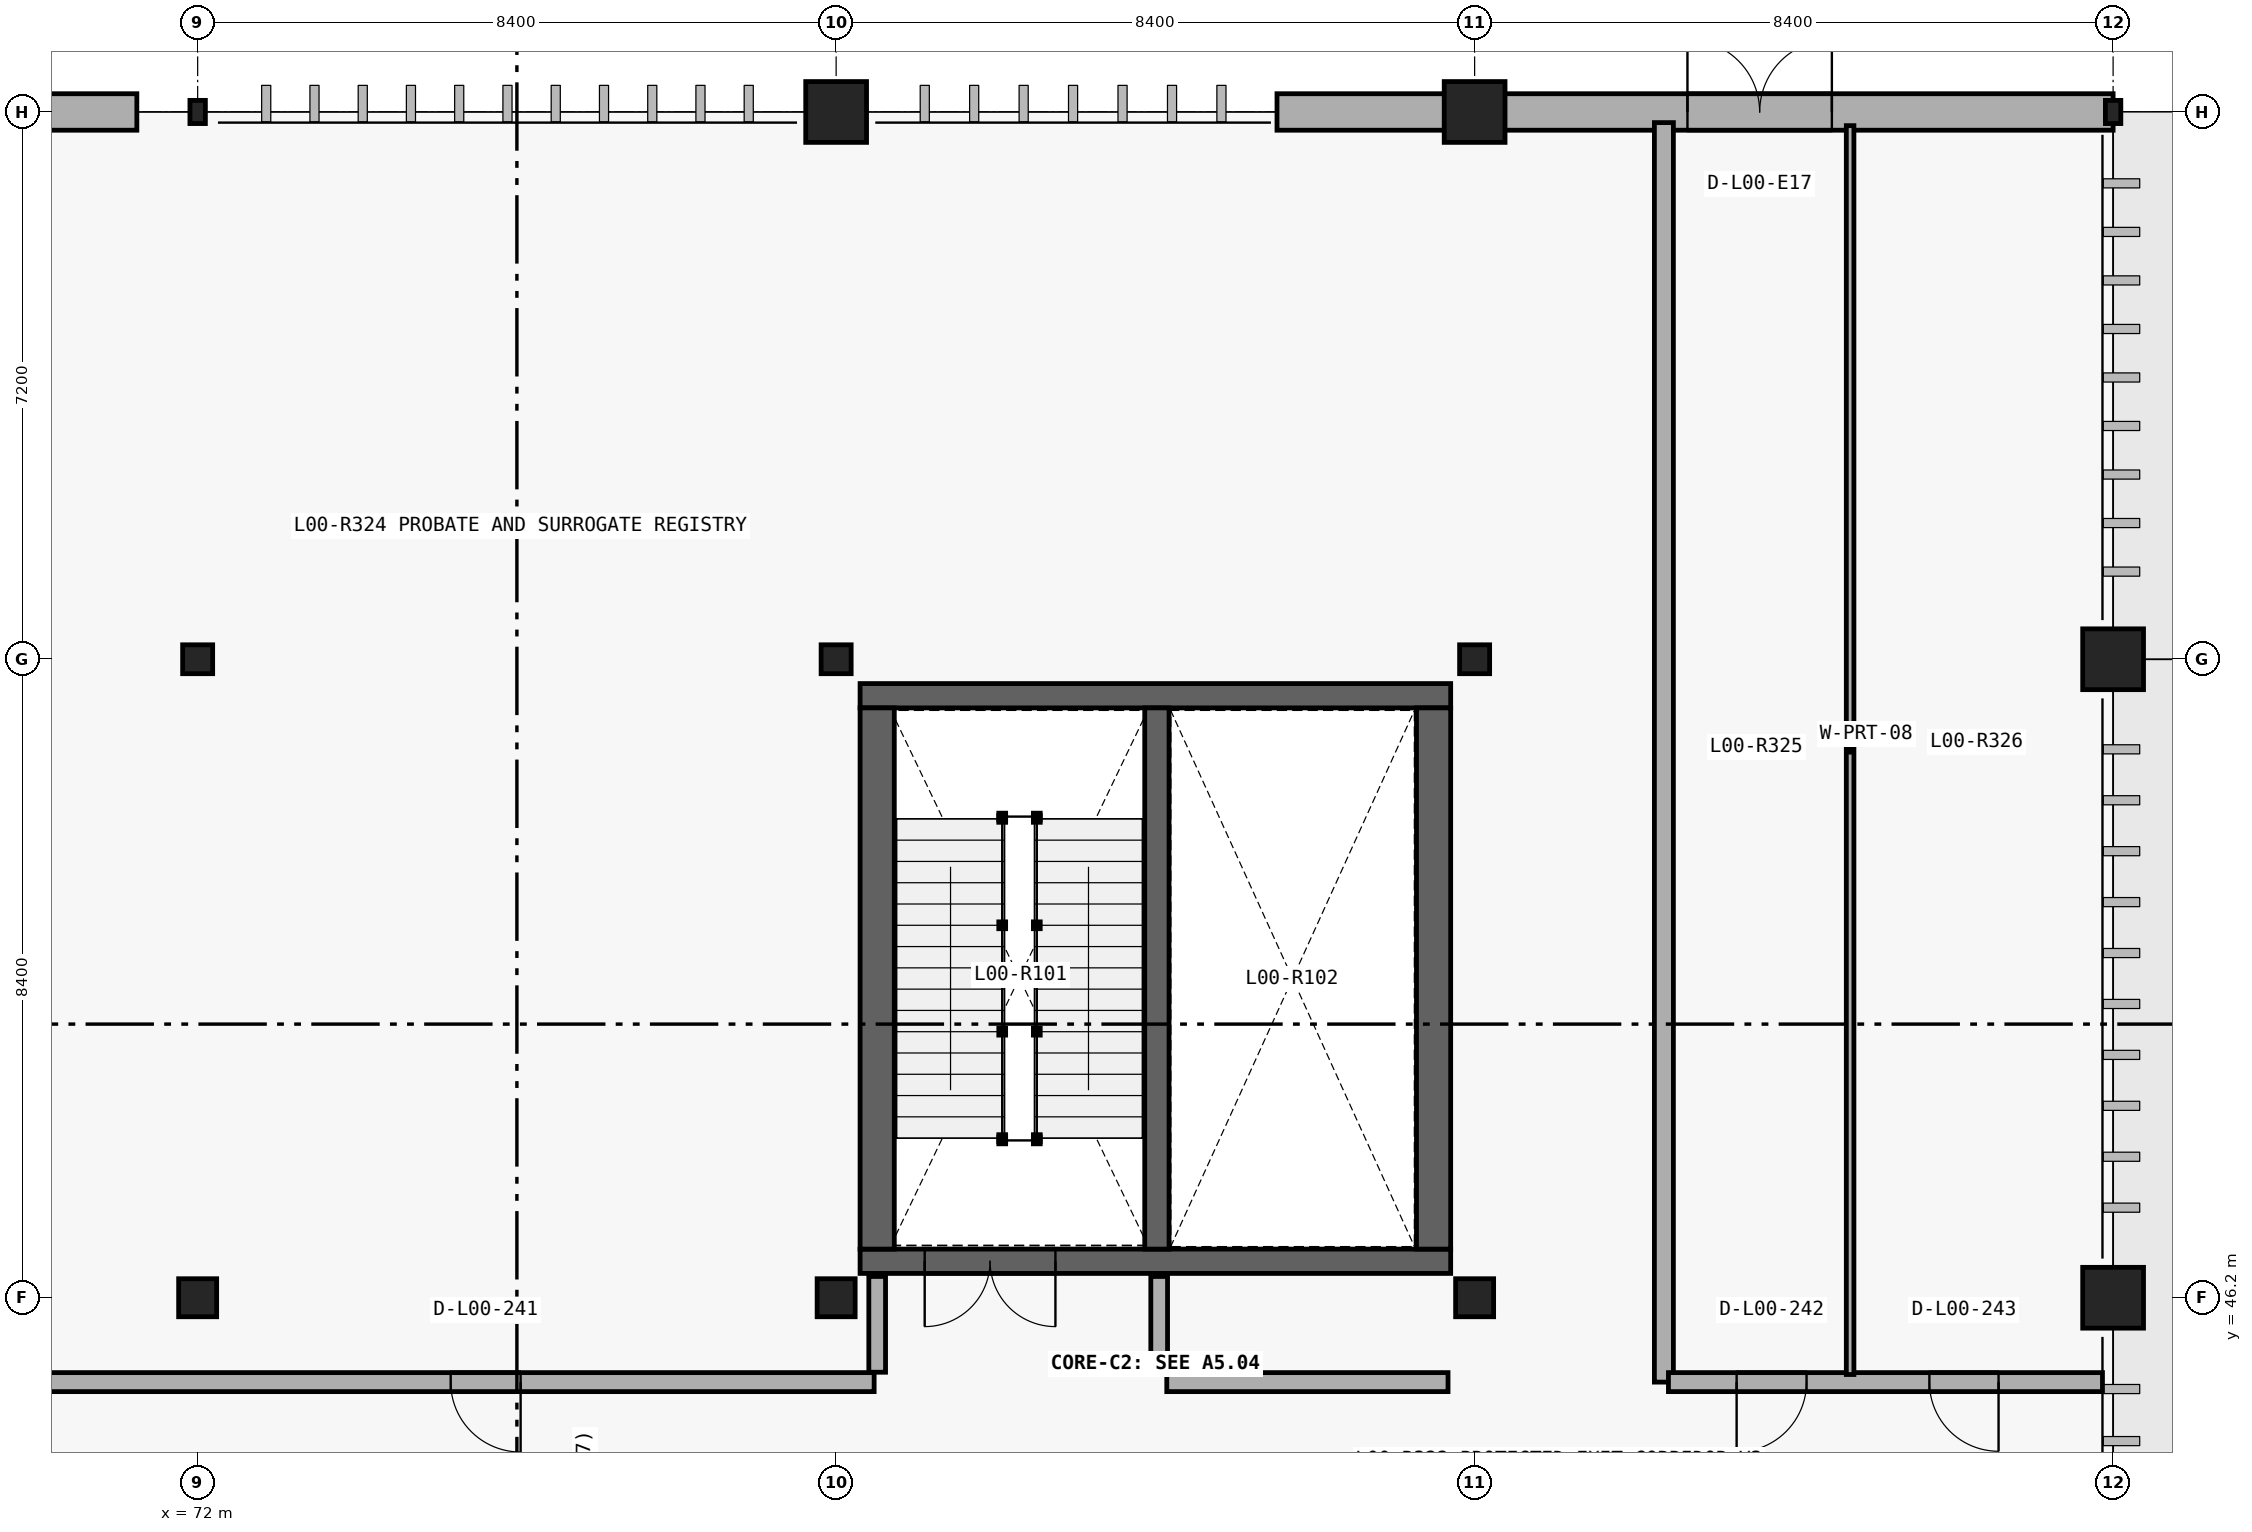
"""IFC4 building model, lengths in metres.
Left out: names, types, materials, properties, quantities, classifications, styles, units other than length and angle.
Written with IfcOpenShell. Run it as: python <this file> out.ifc"""

import sys

from ifc_helpers import new_model, si_unit, direction, frame, frame_2d, origin_with_axes, origin_2d_with_axis, place, context, subcontext, project, spatial, rectangle, hollow_rectangle, circle, i_section, extrude, element, fill, save


model = new_model("IFC4")
c1 = context("Model", 3, precision=1e-05, world=origin_with_axes(), true_north=direction((0.0, 1.0)))
c2 = subcontext(c1, "Body", "Model", "MODEL_VIEW")
j1 = project(units=[si_unit("LENGTHUNIT", "METRE"), si_unit("PLANEANGLEUNIT", "RADIAN")], contexts=[c1])
p1 = place(None, origin_with_axes())
s1 = spatial("IfcSite", under=j1, at=p1, CompositionType="ELEMENT")
p2 = place(p1, origin_with_axes())
s2 = spatial("IfcBuilding", under=s1, at=p2, CompositionType="ELEMENT")
p3 = place(p2, origin_with_axes())
s3 = spatial("IfcBuildingStorey", under=s2, at=p3, CompositionType="ELEMENT", Elevation=0.0)
p4 = place(None, frame((64.4, 61.8, 0.0), z_axis=(0.0, 0.0, 1.0), x_axis=(1.0, 0.0, 0.0)))
e1 = element("IfcWall", 1, at=p4, inside=s3, PredefinedType="SOLIDWALL", context=c2, shape_type="SweptSolid", body=[
    extrude(rectangle(XDim=6.8, YDim=0.48, at=frame_2d((3.4, 0.0), x_axis=(1.0, 0.0))), origin_with_axes(), (0.0, 0.0, 1.0), 4.825),
])
p5 = place(None, frame((67.85, 61.8, 0.0), z_axis=(0.0, 0.0, 1.0), x_axis=(1.0, 0.0, 0.0)))
e2 = element("IfcOpeningElement", 2, at=p5, cuts=e1, PredefinedType="OPENING", context=c2, shape_type="SweptSolid", body=[
    extrude(rectangle(XDim=1.9, YDim=2.4, at=frame_2d((0.0, 1.2), x_axis=(1.0, 0.0))), frame((0.0, 0.25, 0.0), z_axis=(0.0, -1.0, 0.0), x_axis=(1.0, 0.0, 0.0)), (0.0, 0.0, 1.0), 0.5),
])
p6 = place(None, frame((86.2, 61.8, 0.0), z_axis=(0.0, 0.0, 1.0), x_axis=(1.0, 0.0, 0.0)))
e3 = element("IfcWall", 3, at=p6, inside=s3, PredefinedType="SOLIDWALL", context=c2, shape_type="SweptSolid", body=[
    extrude(rectangle(XDim=11.0, YDim=0.48, at=frame_2d((5.5, 0.0), x_axis=(1.0, 0.0))), origin_with_axes(), (0.0, 0.0, 1.0), 4.724),
])
p7 = place(None, frame((92.55, 61.8, 0.0), z_axis=(0.0, 0.0, 1.0), x_axis=(1.0, 0.0, 0.0)))
e4 = element("IfcOpeningElement", 4, at=p7, cuts=e3, PredefinedType="OPENING", context=c2, shape_type="SweptSolid", body=[
    extrude(rectangle(XDim=1.9, YDim=2.4, at=frame_2d((0.0, 1.2), x_axis=(1.0, 0.0))), frame((0.0, 0.25, 0.0), z_axis=(0.0, -1.0, 0.0), x_axis=(1.0, 0.0, 0.0)), (0.0, 0.0, 1.0), 0.5),
])
p8 = place(None, frame((80.715, 46.68, 0.0), z_axis=(0.0, 0.0, 1.0), x_axis=(1.0, 0.0, 0.0)))
e5 = element("IfcWall", 5, at=p8, inside=s3, PredefinedType="SHEAR", context=c2, shape_type="SweptSolid", body=[
    extrude(rectangle(XDim=7.77, YDim=0.32, at=frame_2d((3.885, 0.0), x_axis=(1.0, 0.0))), origin_with_axes(), (0.0, 0.0, 1.0), 5.4),
])
p9 = place(None, frame((82.425, 46.68, 0.0), z_axis=(0.0, 0.0, 1.0), x_axis=(1.0, 0.0, 0.0)))
e6 = element("IfcOpeningElement", 6, at=p9, cuts=e5, PredefinedType="OPENING", context=c2, shape_type="SweptSolid", body=[
    extrude(rectangle(XDim=1.72, YDim=2.18, at=frame_2d((0.0, 1.09), x_axis=(1.0, 0.0))), frame((0.0, 0.17, 0.0), z_axis=(0.0, -1.0, 0.0), x_axis=(1.0, 0.0, 0.0)), (0.0, 0.0, 1.0), 0.34),
])
p10 = place(None, frame((88.485, 54.12, 0.0), z_axis=(0.0, 0.0, 1.0), x_axis=(-1.0, 0.0, 0.0)))
e7 = element("IfcWall", 7, at=p10, inside=s3, PredefinedType="SHEAR", context=c2, shape_type="SweptSolid", body=[
    extrude(rectangle(XDim=7.77, YDim=0.32, at=frame_2d((3.885, 0.0), x_axis=(1.0, 0.0))), origin_with_axes(), (0.0, 0.0, 1.0), 5.4),
])
for number, where, z_axis, x_axis in (
    (8, (88.26, 46.84, 0.0), (0.0, 0.0, 1.0), (0.0, 1.0, 0.0)),
    (9, (80.94, 53.96, 0.0), (0.0, 0.0, 1.0), (0.0, -1.0, 0.0)),
):
    element("IfcWall", number, at=place(None, frame(where, z_axis=z_axis, x_axis=x_axis)), inside=s3, PredefinedType="SHEAR", context=c2, shape_type="SweptSolid", body=[
        extrude(rectangle(XDim=7.12, YDim=0.45, at=frame_2d((3.56, 0.0), x_axis=(1.0, 0.0))), origin_with_axes(), (0.0, 0.0, 1.0), 5.4),
    ])
p11 = place(None, frame((84.62, 46.84, 0.0), z_axis=(0.0, 0.0, 1.0), x_axis=(0.0, 1.0, 0.0)))
e10 = element("IfcWall", 10, at=p11, inside=s3, PredefinedType="SHEAR", context=c2, shape_type="SweptSolid", body=[
    extrude(rectangle(XDim=7.12, YDim=0.32, at=frame_2d((3.56, 0.0), x_axis=(1.0, 0.0))), origin_with_axes(), (0.0, 0.0, 1.0), 5.4),
])
p12 = place(None, frame((91.29, 45.09, 0.0), z_axis=(0.0, 0.0, 1.0), x_axis=(0.0, 1.0, 0.0)))
e11 = element("IfcWall", 11, at=p12, inside=s3, PredefinedType="PARTITIONING", context=c2, shape_type="SweptSolid", body=[
    extrude(rectangle(XDim=16.57, YDim=0.25, at=frame_2d((8.285, 0.0), x_axis=(1.0, 0.0))), origin_with_axes(), (0.0, 0.0, 1.0), 5.08),
])
for number, where, z_axis, x_axis in (
    (12, (80.94, 45.22, 0.0), (0.0, 0.0, 1.0), (0.0, 1.0, 0.0)),
    (13, (84.65, 45.22, 0.0), (0.0, 0.0, 1.0), (0.0, 1.0, 0.0)),
):
    element("IfcWall", number, at=place(None, frame(where, z_axis=z_axis, x_axis=x_axis)), inside=s3, PredefinedType="PARTITIONING", context=c2, shape_type="SweptSolid", body=[
        extrude(rectangle(XDim=1.26, YDim=0.22, at=frame_2d((0.63, 0.0), x_axis=(1.0, 0.0))), origin_with_axes(), (0.0, 0.0, 1.0), 5.08),
    ])
p13 = place(None, frame((69.55, 45.09, 0.0), z_axis=(0.0, 0.0, 1.0), x_axis=(1.0, 0.0, 0.0)))
e14 = element("IfcWall", 14, at=p13, inside=s3, PredefinedType="PARTITIONING", context=c2, shape_type="SweptSolid", body=[
    extrude(rectangle(XDim=11.35, YDim=0.25, at=frame_2d((5.675, 0.0), x_axis=(1.0, 0.0))), origin_with_axes(), (0.0, 0.0, 1.0), 5.08),
])
p14 = place(None, frame((75.789, 45.09, 0.0), z_axis=(0.0, 0.0, 1.0), x_axis=(1.0, 0.0, 0.0)))
e15 = element("IfcOpeningElement", 15, at=p14, cuts=e14, PredefinedType="OPENING", context=c2, shape_type="SweptSolid", body=[
    extrude(rectangle(XDim=0.92, YDim=2.14, at=frame_2d((0.0, 1.07), x_axis=(1.0, 0.0))), frame((0.0, 0.135, 0.0), z_axis=(0.0, -1.0, 0.0), x_axis=(1.0, 0.0, 0.0)), (0.0, 0.0, 1.0), 0.27),
])
p15 = place(None, frame((84.75, 45.09, 0.0), z_axis=(0.0, 0.0, 1.0), x_axis=(1.0, 0.0, 0.0)))
e16 = element("IfcWall", 16, at=p15, inside=s3, PredefinedType="PARTITIONING", context=c2, shape_type="SweptSolid", body=[
    extrude(rectangle(XDim=3.7, YDim=0.25, at=frame_2d((1.85, 0.0), x_axis=(1.0, 0.0))), origin_with_axes(), (0.0, 0.0, 1.0), 5.08),
])
p16 = place(None, frame((91.35, 45.09, 0.0), z_axis=(0.0, 0.0, 1.0), x_axis=(1.0, 0.0, 0.0)))
e17 = element("IfcWall", 17, at=p16, inside=s3, PredefinedType="PARTITIONING", context=c2, shape_type="SweptSolid", body=[
    extrude(rectangle(XDim=5.71, YDim=0.25, at=frame_2d((2.855, 0.0), x_axis=(1.0, 0.0))), origin_with_axes(), (0.0, 0.0, 1.0), 5.08),
])
p17 = place(None, frame((92.707, 45.09, 0.0), z_axis=(0.0, 0.0, 1.0), x_axis=(1.0, 0.0, 0.0)))
e18 = element("IfcOpeningElement", 18, at=p17, cuts=e17, PredefinedType="OPENING", context=c2, shape_type="SweptSolid", body=[
    extrude(rectangle(XDim=0.92, YDim=2.14, at=frame_2d((0.0, 1.07), x_axis=(1.0, 0.0))), frame((0.0, 0.135, 0.0), z_axis=(0.0, -1.0, 0.0), x_axis=(1.0, 0.0, 0.0)), (0.0, 0.0, 1.0), 0.27),
])
p18 = place(None, frame((95.238, 45.09, 0.0), z_axis=(0.0, 0.0, 1.0), x_axis=(1.0, 0.0, 0.0)))
e19 = element("IfcOpeningElement", 19, at=p18, cuts=e17, PredefinedType="OPENING", context=c2, shape_type="SweptSolid", body=[
    extrude(rectangle(XDim=0.91, YDim=2.12, at=frame_2d((0.0, 1.06), x_axis=(1.0, 0.0))), frame((0.0, 0.135, 0.0), z_axis=(0.0, -1.0, 0.0), x_axis=(1.0, 0.0, 0.0)), (0.0, 0.0, 1.0), 0.27),
])
p19 = place(None, frame((93.74, 45.19, 0.0), z_axis=(0.0, 0.0, 1.0), x_axis=(0.0, 1.0, 0.0)))
e20 = element("IfcWall", 20, at=p19, inside=s3, PredefinedType="PARTITIONING", context=c2, shape_type="SweptSolid", body=[
    extrude(rectangle(XDim=16.43, YDim=0.1, at=frame_2d((8.215, 0.0), x_axis=(1.0, 0.0))), origin_with_axes(), (0.0, 0.0, 1.0), 5.08),
])
p20 = place(None, frame((72.0, 46.2, 0.0), z_axis=(0.0, 0.0, 1.0), x_axis=(1.0, 0.0, 0.0)))
e21 = element("IfcColumn", 21, at=p20, inside=s3, PredefinedType="COLUMN", context=c2, shape_type="SweptSolid", body=[
    extrude(i_section(OverallWidth=0.5, OverallDepth=0.5, WebThickness=0.022, FlangeThickness=0.036, at=origin_2d_with_axis()), origin_with_axes(), (0.0, 0.0, 1.0), 5.4),
])
p21 = place(None, frame((72.0, 54.6, 0.0), z_axis=(0.0, 0.0, 1.0), x_axis=(1.0, 0.0, 0.0)))
e22 = element("IfcColumn", 22, at=p21, inside=s3, PredefinedType="COLUMN", context=c2, shape_type="SweptSolid", body=[
    extrude(i_section(OverallWidth=0.395, OverallDepth=0.38, WebThickness=0.019, FlangeThickness=0.03, at=origin_2d_with_axis()), origin_with_axes(), (0.0, 0.0, 1.0), 5.4),
])
p22 = place(None, frame((72.0, 61.8, 0.0), z_axis=(0.0, 0.0, 1.0), x_axis=(1.0, 0.0, 0.0)))
e23 = element("IfcColumn", 23, at=p22, inside=s3, PredefinedType="COLUMN", context=c2, shape_type="SweptSolid", body=[
    extrude(hollow_rectangle(XDim=0.203, YDim=0.305, WallThickness=0.013, InnerFilletRadius=0.025, OuterFilletRadius=0.013, at=origin_2d_with_axis()), origin_with_axes(), (0.0, 0.0, 1.0), 5.4),
])
p23 = place(None, frame((80.4, 46.2, 0.0), z_axis=(0.0, 0.0, 1.0), x_axis=(1.0, 0.0, 0.0)))
e24 = element("IfcColumn", 24, at=p23, inside=s3, PredefinedType="COLUMN", context=c2, shape_type="SweptSolid", body=[
    extrude(i_section(OverallWidth=0.5, OverallDepth=0.5, WebThickness=0.022, FlangeThickness=0.036, at=origin_2d_with_axis()), origin_with_axes(), (0.0, 0.0, 1.0), 5.4),
])
p24 = place(None, frame((80.4, 54.6, 0.0), z_axis=(0.0, 0.0, 1.0), x_axis=(1.0, 0.0, 0.0)))
e25 = element("IfcColumn", 25, at=p24, inside=s3, PredefinedType="COLUMN", context=c2, shape_type="SweptSolid", body=[
    extrude(i_section(OverallWidth=0.395, OverallDepth=0.38, WebThickness=0.019, FlangeThickness=0.03, at=origin_2d_with_axis()), origin_with_axes(), (0.0, 0.0, 1.0), 5.4),
])
p25 = place(None, frame((80.4, 61.8, 0.0), z_axis=(0.0, 0.0, 1.0), x_axis=(1.0, 0.0, 0.0)))
e26 = element("IfcColumn", 26, at=p25, inside=s3, PredefinedType="COLUMN", context=c2, shape_type="SweptSolid", body=[
    extrude(circle(Radius=0.4, at=origin_2d_with_axis()), origin_with_axes(), (0.0, 0.0, 1.0), 5.4),
])
p26 = place(None, frame((88.8, 46.2, 0.0), z_axis=(0.0, 0.0, 1.0), x_axis=(1.0, 0.0, 0.0)))
e27 = element("IfcColumn", 27, at=p26, inside=s3, PredefinedType="COLUMN", context=c2, shape_type="SweptSolid", body=[
    extrude(i_section(OverallWidth=0.5, OverallDepth=0.5, WebThickness=0.022, FlangeThickness=0.036, at=origin_2d_with_axis()), origin_with_axes(), (0.0, 0.0, 1.0), 5.4),
])
p27 = place(None, frame((88.8, 54.6, 0.0), z_axis=(0.0, 0.0, 1.0), x_axis=(1.0, 0.0, 0.0)))
e28 = element("IfcColumn", 28, at=p27, inside=s3, PredefinedType="COLUMN", context=c2, shape_type="SweptSolid", body=[
    extrude(i_section(OverallWidth=0.395, OverallDepth=0.38, WebThickness=0.019, FlangeThickness=0.03, at=origin_2d_with_axis()), origin_with_axes(), (0.0, 0.0, 1.0), 5.4),
])
for number, where, z_axis, x_axis in (
    (29, (88.8, 61.8, 0.0), (0.0, 0.0, 1.0), (1.0, 0.0, 0.0)),
    (30, (97.2, 46.2, 0.0), (0.0, 0.0, 1.0), (1.0, 0.0, 0.0)),
    (31, (97.2, 54.6, 0.0), (0.0, 0.0, 1.0), (1.0, 0.0, 0.0)),
):
    element("IfcColumn", number, at=place(None, frame(where, z_axis=z_axis, x_axis=x_axis)), inside=s3, PredefinedType="COLUMN", context=c2, shape_type="SweptSolid", body=[
        extrude(circle(Radius=0.4, at=origin_2d_with_axis()), origin_with_axes(), (0.0, 0.0, 1.0), 5.4),
    ])
p28 = place(None, frame((97.2, 61.8, 0.0), z_axis=(0.0, 0.0, 1.0), x_axis=(1.0, 0.0, 0.0)))
e32 = element("IfcColumn", 32, at=p28, inside=s3, PredefinedType="COLUMN", context=c2, shape_type="SweptSolid", body=[
    extrude(hollow_rectangle(XDim=0.203, YDim=0.305, WallThickness=0.013, InnerFilletRadius=0.025, OuterFilletRadius=0.013, at=origin_2d_with_axis()), origin_with_axes(), (0.0, 0.0, 1.0), 5.4),
])
p29 = place(None, frame((92.55, 61.8, 0.0), z_axis=(0.0, 0.0, 1.0), x_axis=(1.0, 0.0, 0.0)))
e33 = element("IfcDoor", 33, at=p29, inside=s3, OperationType="DOUBLE_DOOR_SINGLE_SWING", PredefinedType="DOOR", context=c2, shape_type="SweptSolid", body=[
    extrude(rectangle(XDim=1.9, YDim=2.4, at=frame_2d((0.0, 1.2), x_axis=(1.0, 0.0))), frame((0.0, 0.04, 0.0), z_axis=(0.0, -1.0, 0.0), x_axis=(1.0, 0.0, 0.0)), (0.0, 0.0, 1.0), 0.08),
])
fill(e4, e33)
p30 = place(None, frame((82.425, 46.68, 0.0), z_axis=(0.0, 0.0, 1.0), x_axis=(-1.0, 0.0, 0.0)))
e34 = element("IfcDoor", 34, at=p30, inside=s3, OperationType="DOUBLE_DOOR_SINGLE_SWING", PredefinedType="DOOR", context=c2, shape_type="SweptSolid", body=[
    extrude(rectangle(XDim=1.72, YDim=2.18, at=frame_2d((0.0, 1.09), x_axis=(1.0, 0.0))), frame((0.0, 0.04, 0.0), z_axis=(0.0, -1.0, 0.0), x_axis=(1.0, 0.0, 0.0)), (0.0, 0.0, 1.0), 0.08),
])
fill(e6, e34)
p31 = place(None, frame((75.789, 45.09, 0.0), z_axis=(0.0, 0.0, 1.0), x_axis=(-1.0, 0.0, 0.0)))
e35 = element("IfcDoor", 35, at=p31, inside=s3, OperationType="SINGLE_SWING_RIGHT", PredefinedType="DOOR", context=c2, shape_type="SweptSolid", body=[
    extrude(rectangle(XDim=0.92, YDim=2.14, at=frame_2d((0.0, 1.07), x_axis=(1.0, 0.0))), frame((0.0, 0.04, 0.0), z_axis=(0.0, -1.0, 0.0), x_axis=(1.0, 0.0, 0.0)), (0.0, 0.0, 1.0), 0.08),
])
fill(e15, e35)
p32 = place(None, frame((92.707, 45.09, 0.0), z_axis=(0.0, 0.0, 1.0), x_axis=(-1.0, 0.0, 0.0)))
e36 = element("IfcDoor", 36, at=p32, inside=s3, OperationType="SINGLE_SWING_LEFT", PredefinedType="DOOR", context=c2, shape_type="SweptSolid", body=[
    extrude(rectangle(XDim=0.92, YDim=2.14, at=frame_2d((0.0, 1.07), x_axis=(1.0, 0.0))), frame((0.0, 0.04, 0.0), z_axis=(0.0, -1.0, 0.0), x_axis=(1.0, 0.0, 0.0)), (0.0, 0.0, 1.0), 0.08),
])
fill(e18, e36)
p33 = place(None, frame((95.238, 45.09, 0.0), z_axis=(0.0, 0.0, 1.0), x_axis=(-1.0, 0.0, 0.0)))
e37 = element("IfcDoor", 37, at=p33, inside=s3, OperationType="SINGLE_SWING_RIGHT", PredefinedType="DOOR", context=c2, shape_type="SweptSolid", body=[
    extrude(rectangle(XDim=0.91, YDim=2.12, at=frame_2d((0.0, 1.06), x_axis=(1.0, 0.0))), frame((0.0, 0.04, 0.0), z_axis=(0.0, -1.0, 0.0), x_axis=(1.0, 0.0, 0.0)), (0.0, 0.0, 1.0), 0.08),
])
fill(e19, e37)
save(model, sys.argv[1])
